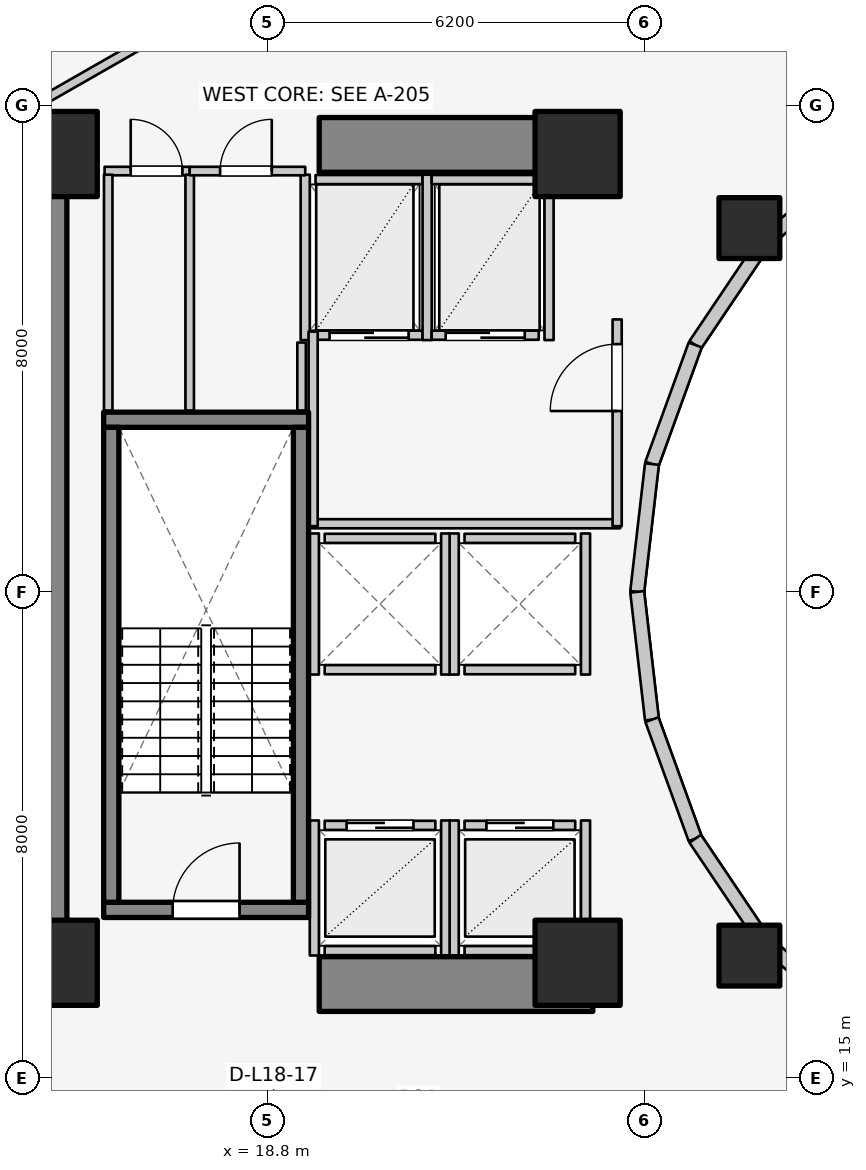
"""IFC4 building model, lengths in metres.
Left out: names, types, materials, properties, quantities, classifications, styles, units other than length and angle.
Written with IfcOpenShell. Run it as: python <this file> out.ifc"""

import sys

from ifc_helpers import new_model, si_unit, direction, frame, frame_2d, origin, origin_2d, place, context, subcontext, project, spatial, rectangle, extrude, element, fill, save


model = new_model("IFC4")
c1 = context("Model", 3, precision=1e-05, world=origin(), true_north=direction((0.0, 1.0)))
c2 = subcontext(c1, "Body", "Model", "MODEL_VIEW")
j1 = project(units=[si_unit("LENGTHUNIT", "METRE"), si_unit("PLANEANGLEUNIT", "RADIAN")], contexts=[c1])
p1 = place(None, origin())
s1 = spatial("IfcSite", under=j1, at=p1, CompositionType="ELEMENT")
p2 = place(p1, origin())
s2 = spatial("IfcBuilding", under=s1, at=p2, CompositionType="ELEMENT")
p3 = place(p2, frame((0.0, 0.0, 61.7)))
s3 = spatial("IfcBuildingStorey", under=s2, at=p3, CompositionType="ELEMENT", Elevation=61.7)
p4 = place(p3, frame((15.05, 17.05, 0.0), z_axis=(0.0, 0.0, 1.0), x_axis=(0.0, 1.0, 0.0)))
e1 = element("IfcWall", 1, at=p4, inside=s3, PredefinedType="SHEAR", context=c2, shape_type="SweptSolid", body=[
    extrude(rectangle(XDim=12.8, YDim=0.9, at=frame_2d((6.4, 0.0))), origin(), (0.0, 0.0, 1.0), 3.1),
])
for number, where, z_axis, x_axis in (
    (2, (19.65, 16.55, 0.0), (0.0, 0.0, 1.0), (1.0, 0.0, 0.0)),
    (3, (19.65, 30.35, 0.0), (0.0, 0.0, 1.0), (1.0, 0.0, 0.0)),
):
    element("IfcWall", number, at=place(p3, frame(where, z_axis=z_axis, x_axis=x_axis)), inside=s3, PredefinedType="SHEAR", context=c2, shape_type="SweptSolid", body=[
        extrude(rectangle(XDim=4.5, YDim=0.9, at=frame_2d((2.25, 0.0))), origin(), (0.0, 0.0, 1.0), 3.1),
    ])
p5 = place(p3, frame((16.105, 17.77, 0.0), z_axis=(0.0, 0.0, 1.0), x_axis=(1.0, 0.0, 0.0)))
e4 = element("IfcWall", 4, at=p5, inside=s3, PredefinedType="SOLIDWALL", context=c2, shape_type="SweptSolid", body=[
    extrude(rectangle(XDim=3.37, YDim=0.25, at=frame_2d((1.685, 0.0))), origin(), (0.0, 0.0, 1.0), 3.1),
])
p6 = place(p5, frame((1.135, 0.0, 0.0)))
e5 = element("IfcOpeningElement", 5, at=p6, cuts=e4, PredefinedType="OPENING", context=c2, shape_type="SweptSolid", body=[
    extrude(rectangle(XDim=1.1, YDim=2.1, at=frame_2d((0.55, 1.05))), frame((0.0, 0.135, 0.0), z_axis=(0.0, -1.0, 0.0), x_axis=(1.0, 0.0, 0.0)), (0.0, 0.0, 1.0), 0.27),
])
p7 = place(p3, frame((16.105, 25.83, 0.0), z_axis=(0.0, 0.0, 1.0), x_axis=(1.0, 0.0, 0.0)))
e6 = element("IfcWall", 6, at=p7, inside=s3, PredefinedType="SOLIDWALL", context=c2, shape_type="SweptSolid", body=[
    extrude(rectangle(XDim=3.37, YDim=0.25, at=frame_2d((1.685, 0.0))), origin(), (0.0, 0.0, 1.0), 3.1),
])
for number, where, z_axis, x_axis in (
    (7, (16.23, 17.895, 0.0), (0.0, 0.0, 1.0), (0.0, 1.0, 0.0)),
    (8, (19.35, 17.895, 0.0), (0.0, 0.0, 1.0), (0.0, 1.0, 0.0)),
):
    element("IfcWall", number, at=place(p3, frame(where, z_axis=z_axis, x_axis=x_axis)), inside=s3, PredefinedType="SOLIDWALL", context=c2, shape_type="SweptSolid", body=[
        extrude(rectangle(XDim=7.81, YDim=0.25, at=frame_2d((3.905, 0.0))), origin(), (0.0, 0.0, 1.0), 3.1),
    ])
for number, where, z_axis, x_axis in (
    (9, (15.3, 16.9, 0.0), (0.0, 0.0, 1.0), (1.0, 0.0, 0.0)),
    (10, (23.9, 16.9, 0.0), (0.0, 0.0, 1.0), (1.0, 0.0, 0.0)),
    (11, (23.9, 30.2, 0.0), (0.0, 0.0, 1.0), (1.0, 0.0, 0.0)),
    (12, (15.3, 30.2, 0.0), (0.0, 0.0, 1.0), (1.0, 0.0, 0.0)),
):
    element("IfcColumn", number, at=place(p3, frame(where, z_axis=z_axis, x_axis=x_axis)), inside=s3, PredefinedType="COLUMN", context=c2, shape_type="SweptSolid", body=[
        extrude(rectangle(XDim=1.4, YDim=1.4, at=origin_2d()), origin(), (0.0, 0.0, 1.0), 3.1),
    ])
for number, where, z_axis, x_axis in (
    (13, (26.725, 28.982, 0.0), (0.0, 0.0, 1.0), (1.0, 0.0, 0.0)),
    (14, (26.725, 17.018, 0.0), (0.0, 0.0, 1.0), (1.0, 0.0, 0.0)),
):
    element("IfcColumn", number, at=place(p3, frame(where, z_axis=z_axis, x_axis=x_axis)), inside=s3, PredefinedType="COLUMN", context=c2, shape_type="SweptSolid", body=[
        extrude(rectangle(XDim=1.0, YDim=1.0, at=origin_2d()), origin(), (0.0, 0.0, 1.0), 3.1),
    ])
p8 = place(p3, frame((28.44, 30.032, 0.0), z_axis=(0.0, 0.0, 1.0), x_axis=(-0.752576694707, -0.658504607869, 0.0)))
e15 = element("IfcWall", 15, at=p8, inside=s3, PredefinedType="STANDARD", context=c2, shape_type="SweptSolid", body=[
    extrude(rectangle(XDim=1.959, YDim=0.23, at=frame_2d((0.98, 0.0))), origin(), (0.0, 0.0, 1.0), 1.22),
])
p9 = place(p3, frame((26.965, 28.742, 0.0), z_axis=(0.0, 0.0, 1.0), x_axis=(-0.558197800898, -0.829707909492, 0.0)))
e16 = element("IfcWall", 16, at=p9, inside=s3, PredefinedType="STANDARD", context=c2, shape_type="SweptSolid", body=[
    extrude(rectangle(XDim=2.027, YDim=0.23, at=frame_2d((1.013, 0.0))), origin(), (0.0, 0.0, 1.0), 1.22),
])
p10 = place(p3, frame((25.834, 27.06, 0.0), z_axis=(0.0, 0.0, 1.0), x_axis=(-0.341423187295, -0.93990968033, 0.0)))
e17 = element("IfcWall", 17, at=p10, inside=s3, PredefinedType="STANDARD", context=c2, shape_type="SweptSolid", body=[
    extrude(rectangle(XDim=2.084, YDim=0.23, at=frame_2d((1.042, 0.0))), origin(), (0.0, 0.0, 1.0), 2.56),
])
for number, where, z_axis, x_axis in (
    (18, (25.123, 25.102, 0.0), (0.0, 0.0, 1.0), (-0.115, -0.993, 0.0)),
    (19, (24.88, 23.0, 0.0), (0.0, 0.0, 1.0), (0.115, -0.993, 0.0)),
):
    element("IfcWall", number, at=place(p3, frame(where, z_axis=z_axis, x_axis=x_axis)), inside=s3, PredefinedType="STANDARD", context=c2, shape_type="SweptSolid", body=[
        extrude(rectangle(XDim=2.115, YDim=0.23, at=frame_2d((1.058, 0.0))), origin(), (0.0, 0.0, 1.0), 2.56),
    ])
p11 = place(p3, frame((25.123, 20.898, 0.0), z_axis=(0.0, 0.0, 1.0), x_axis=(0.341423187295, -0.93990968033, 0.0)))
e20 = element("IfcWall", 20, at=p11, inside=s3, PredefinedType="STANDARD", context=c2, shape_type="SweptSolid", body=[
    extrude(rectangle(XDim=2.084, YDim=0.23, at=frame_2d((1.042, 0.0))), origin(), (0.0, 0.0, 1.0), 2.56),
])
p12 = place(p3, frame((25.834, 18.94, 0.0), z_axis=(0.0, 0.0, 1.0), x_axis=(0.558197800898, -0.829707909492, 0.0)))
e21 = element("IfcWall", 21, at=p12, inside=s3, PredefinedType="STANDARD", context=c2, shape_type="SweptSolid", body=[
    extrude(rectangle(XDim=2.027, YDim=0.23, at=frame_2d((1.013, 0.0))), origin(), (0.0, 0.0, 1.0), 1.22),
])
p13 = place(p3, frame((26.965, 17.258, 0.0), z_axis=(0.0, 0.0, 1.0), x_axis=(0.752576694707, -0.658504607869, 0.0)))
e22 = element("IfcWall", 22, at=p13, inside=s3, PredefinedType="STANDARD", context=c2, shape_type="SweptSolid", body=[
    extrude(rectangle(XDim=1.959, YDim=0.23, at=frame_2d((0.98, 0.0))), origin(), (0.0, 0.0, 1.0), 1.22),
])
p14 = place(p3, frame((19.74, 19.16, 0.0), z_axis=(0.0, 0.0, 1.0), x_axis=(1.0, 0.0, 0.0)))
e23 = element("IfcWall", 23, at=p14, inside=s3, PredefinedType="SOLIDWALL", context=c2, shape_type="SweptSolid", body=[
    extrude(rectangle(XDim=1.82, YDim=0.15, at=frame_2d((0.91, 0.0))), origin(), (0.0, 0.0, 1.0), 2.575),
])
p15 = place(p14, frame((0.36, 0.0, 0.0)))
e24 = element("IfcOpeningElement", 24, at=p15, cuts=e23, PredefinedType="OPENING", context=c2, shape_type="SweptSolid", body=[
    extrude(rectangle(XDim=1.1, YDim=2.1, at=frame_2d((0.55, 1.05))), frame((0.0, 0.085, 0.0), z_axis=(0.0, -1.0, 0.0), x_axis=(1.0, 0.0, 0.0)), (0.0, 0.0, 1.0), 0.17),
])
p16 = place(p3, frame((19.74, 17.1, 0.0), z_axis=(0.0, 0.0, 1.0), x_axis=(1.0, 0.0, 0.0)))
e25 = element("IfcWall", 25, at=p16, inside=s3, PredefinedType="SOLIDWALL", context=c2, shape_type="SweptSolid", body=[
    extrude(rectangle(XDim=1.82, YDim=0.15, at=frame_2d((0.91, 0.0))), origin(), (0.0, 0.0, 1.0), 2.575),
])
p17 = place(p3, frame((19.57, 17.02, 0.0), z_axis=(0.0, 0.0, 1.0), x_axis=(0.0, 1.0, 0.0)))
e26 = element("IfcWall", 26, at=p17, inside=s3, PredefinedType="SOLIDWALL", context=c2, shape_type="SweptSolid", body=[
    extrude(rectangle(XDim=2.22, YDim=0.15, at=frame_2d((1.11, 0.0))), origin(), (0.0, 0.0, 1.0), 2.12),
])
p18 = place(p3, frame((21.73, 17.02, 0.0), z_axis=(0.0, 0.0, 1.0), x_axis=(0.0, 1.0, 0.0)))
e27 = element("IfcWall", 27, at=p18, inside=s3, PredefinedType="SOLIDWALL", context=c2, shape_type="SweptSolid", body=[
    extrude(rectangle(XDim=2.22, YDim=0.15, at=frame_2d((1.11, 0.0))), origin(), (0.0, 0.0, 1.0), 2.575),
])
p19 = place(p3, frame((22.04, 19.16, 0.0), z_axis=(0.0, 0.0, 1.0), x_axis=(1.0, 0.0, 0.0)))
e28 = element("IfcWall", 28, at=p19, inside=s3, PredefinedType="SOLIDWALL", context=c2, shape_type="SweptSolid", body=[
    extrude(rectangle(XDim=1.82, YDim=0.15, at=frame_2d((0.91, 0.0))), origin(), (0.0, 0.0, 1.0), 2.12),
])
p20 = place(p19, frame((0.36, 0.0, 0.0)))
e29 = element("IfcOpeningElement", 29, at=p20, cuts=e28, PredefinedType="OPENING", context=c2, shape_type="SweptSolid", body=[
    extrude(rectangle(XDim=1.1, YDim=2.1, at=frame_2d((0.55, 1.05))), frame((0.0, 0.085, 0.0), z_axis=(0.0, -1.0, 0.0), x_axis=(1.0, 0.0, 0.0)), (0.0, 0.0, 1.0), 0.17),
])
p21 = place(p3, frame((22.04, 17.1, 0.0), z_axis=(0.0, 0.0, 1.0), x_axis=(1.0, 0.0, 0.0)))
e30 = element("IfcWall", 30, at=p21, inside=s3, PredefinedType="SOLIDWALL", context=c2, shape_type="SweptSolid", body=[
    extrude(rectangle(XDim=1.82, YDim=0.15, at=frame_2d((0.91, 0.0))), origin(), (0.0, 0.0, 1.0), 2.12),
])
p22 = place(p3, frame((21.87, 17.02, 0.0), z_axis=(0.0, 0.0, 1.0), x_axis=(0.0, 1.0, 0.0)))
e31 = element("IfcWall", 31, at=p22, inside=s3, PredefinedType="SOLIDWALL", context=c2, shape_type="SweptSolid", body=[
    extrude(rectangle(XDim=2.22, YDim=0.15, at=frame_2d((1.11, 0.0))), origin(), (0.0, 0.0, 1.0), 2.575),
])
p23 = place(p3, frame((24.03, 17.02, 0.0), z_axis=(0.0, 0.0, 1.0), x_axis=(0.0, 1.0, 0.0)))
e32 = element("IfcWall", 32, at=p23, inside=s3, PredefinedType="SOLIDWALL", context=c2, shape_type="SweptSolid", body=[
    extrude(rectangle(XDim=2.22, YDim=0.15, at=frame_2d((1.11, 0.0))), origin(), (0.0, 0.0, 1.0), 1.873),
])
for number, where, z_axis, x_axis in (
    (33, (19.74, 21.72, 0.0), (0.0, 0.0, 1.0), (1.0, 0.0, 0.0)),
    (34, (19.74, 23.88, 0.0), (0.0, 0.0, 1.0), (1.0, 0.0, 0.0)),
):
    element("IfcWall", number, at=place(p3, frame(where, z_axis=z_axis, x_axis=x_axis)), inside=s3, PredefinedType="SOLIDWALL", context=c2, shape_type="SweptSolid", body=[
        extrude(rectangle(XDim=1.82, YDim=0.15, at=frame_2d((0.91, 0.0))), origin(), (0.0, 0.0, 1.0), 2.575),
    ])
for number, where, z_axis, x_axis in (
    (35, (19.57, 21.64, 0.0), (0.0, 0.0, 1.0), (0.0, 1.0, 0.0)),
    (36, (21.73, 21.64, 0.0), (0.0, 0.0, 1.0), (0.0, 1.0, 0.0)),
):
    element("IfcWall", number, at=place(p3, frame(where, z_axis=z_axis, x_axis=x_axis)), inside=s3, PredefinedType="SOLIDWALL", context=c2, shape_type="SweptSolid", body=[
        extrude(rectangle(XDim=2.32, YDim=0.15, at=frame_2d((1.16, 0.0))), origin(), (0.0, 0.0, 1.0), 2.575),
    ])
for number, where, z_axis, x_axis in (
    (37, (22.04, 21.72, 0.0), (0.0, 0.0, 1.0), (1.0, 0.0, 0.0)),
    (38, (22.04, 23.88, 0.0), (0.0, 0.0, 1.0), (1.0, 0.0, 0.0)),
):
    element("IfcWall", number, at=place(p3, frame(where, z_axis=z_axis, x_axis=x_axis)), inside=s3, PredefinedType="SOLIDWALL", context=c2, shape_type="SweptSolid", body=[
        extrude(rectangle(XDim=1.82, YDim=0.15, at=frame_2d((0.91, 0.0))), origin(), (0.0, 0.0, 1.0), 2.12),
    ])
p24 = place(p3, frame((21.87, 21.64, 0.0), z_axis=(0.0, 0.0, 1.0), x_axis=(0.0, 1.0, 0.0)))
e39 = element("IfcWall", 39, at=p24, inside=s3, PredefinedType="SOLIDWALL", context=c2, shape_type="SweptSolid", body=[
    extrude(rectangle(XDim=2.32, YDim=0.15, at=frame_2d((1.16, 0.0))), origin(), (0.0, 0.0, 1.0), 2.575),
])
p25 = place(p3, frame((24.03, 21.64, 0.0), z_axis=(0.0, 0.0, 1.0), x_axis=(0.0, 1.0, 0.0)))
e40 = element("IfcWall", 40, at=p25, inside=s3, PredefinedType="SOLIDWALL", context=c2, shape_type="SweptSolid", body=[
    extrude(rectangle(XDim=2.32, YDim=0.15, at=frame_2d((1.16, 0.0))), origin(), (0.0, 0.0, 1.0), 2.12),
])
p26 = place(p3, frame((19.59, 27.22, 0.0), z_axis=(0.0, 0.0, 1.0), x_axis=(1.0, 0.0, 0.0)))
e41 = element("IfcWall", 41, at=p26, inside=s3, PredefinedType="SOLIDWALL", context=c2, shape_type="SweptSolid", body=[
    extrude(rectangle(XDim=1.76, YDim=0.15, at=frame_2d((0.88, 0.0))), origin(), (0.0, 0.0, 1.0), 2.575),
])
p27 = place(p26, frame((0.23, 0.0, 0.0)))
e42 = element("IfcOpeningElement", 42, at=p27, cuts=e41, PredefinedType="OPENING", context=c2, shape_type="SweptSolid", body=[
    extrude(rectangle(XDim=1.3, YDim=2.1, at=frame_2d((0.65, 1.05))), frame((0.0, 0.085, 0.0), z_axis=(0.0, -1.0, 0.0), x_axis=(1.0, 0.0, 0.0)), (0.0, 0.0, 1.0), 0.17),
])
p28 = place(p3, frame((19.59, 29.78, 0.0), z_axis=(0.0, 0.0, 1.0), x_axis=(1.0, 0.0, 0.0)))
e43 = element("IfcWall", 43, at=p28, inside=s3, PredefinedType="SOLIDWALL", context=c2, shape_type="SweptSolid", body=[
    extrude(rectangle(XDim=1.76, YDim=0.15, at=frame_2d((0.88, 0.0))), origin(), (0.0, 0.0, 1.0), 2.575),
])
for number, where, z_axis, x_axis in (
    (44, (19.42, 27.14, 0.0), (0.0, 0.0, 1.0), (0.0, 1.0, 0.0)),
    (45, (21.425, 27.14, 0.0), (0.0, 0.0, 1.0), (0.0, 1.0, 0.0)),
):
    element("IfcWall", number, at=place(p3, frame(where, z_axis=z_axis, x_axis=x_axis)), inside=s3, PredefinedType="SOLIDWALL", context=c2, shape_type="SweptSolid", body=[
        extrude(rectangle(XDim=2.72, YDim=0.15, at=frame_2d((1.36, 0.0))), origin(), (0.0, 0.0, 1.0), 2.575),
    ])
p29 = place(p3, frame((21.5, 27.22, 0.0), z_axis=(0.0, 0.0, 1.0), x_axis=(1.0, 0.0, 0.0)))
e46 = element("IfcWall", 46, at=p29, inside=s3, PredefinedType="SOLIDWALL", context=c2, shape_type="SweptSolid", body=[
    extrude(rectangle(XDim=1.76, YDim=0.15, at=frame_2d((0.88, 0.0))), origin(), (0.0, 0.0, 1.0), 2.575),
])
p30 = place(p29, frame((0.23, 0.0, 0.0)))
e47 = element("IfcOpeningElement", 47, at=p30, cuts=e46, PredefinedType="OPENING", context=c2, shape_type="SweptSolid", body=[
    extrude(rectangle(XDim=1.3, YDim=2.1, at=frame_2d((0.65, 1.05))), frame((0.0, 0.085, 0.0), z_axis=(0.0, -1.0, 0.0), x_axis=(1.0, 0.0, 0.0)), (0.0, 0.0, 1.0), 0.17),
])
p31 = place(p3, frame((21.5, 29.78, 0.0), z_axis=(0.0, 0.0, 1.0), x_axis=(1.0, 0.0, 0.0)))
e48 = element("IfcWall", 48, at=p31, inside=s3, PredefinedType="SOLIDWALL", context=c2, shape_type="SweptSolid", body=[
    extrude(rectangle(XDim=1.76, YDim=0.15, at=frame_2d((0.88, 0.0))), origin(), (0.0, 0.0, 1.0), 2.575),
])
p32 = place(p3, frame((23.43, 27.14, 0.0), z_axis=(0.0, 0.0, 1.0), x_axis=(0.0, 1.0, 0.0)))
e49 = element("IfcWall", 49, at=p32, inside=s3, PredefinedType="SOLIDWALL", context=c2, shape_type="SweptSolid", body=[
    extrude(rectangle(XDim=2.72, YDim=0.15, at=frame_2d((1.36, 0.0))), origin(), (0.0, 0.0, 1.0), 2.575),
])
p33 = place(p3, frame((19.52, 24.12, 0.0), z_axis=(0.0, 0.0, 1.0), x_axis=(1.0, 0.0, 0.0)))
e50 = element("IfcWall", 50, at=p33, inside=s3, PredefinedType="PARTITIONING", context=c2, shape_type="SweptSolid", body=[
    extrude(rectangle(XDim=5.08, YDim=0.15, at=frame_2d((2.54, 0.0))), origin(), (0.0, 0.0, 1.0), 2.12),
])
p34 = place(p3, frame((19.55, 24.08, 0.0), z_axis=(0.0, 0.0, 1.0), x_axis=(0.0, 1.0, 0.0)))
e51 = element("IfcWall", 51, at=p34, inside=s3, PredefinedType="PARTITIONING", context=c2, shape_type="SweptSolid", body=[
    extrude(rectangle(XDim=3.2, YDim=0.15, at=frame_2d((1.6, 0.0))), origin(), (0.0, 0.0, 1.0), 2.575),
])
p35 = place(p3, frame((24.55, 24.08, 0.0), z_axis=(0.0, 0.0, 1.0), x_axis=(0.0, 1.0, 0.0)))
e52 = element("IfcWall", 52, at=p35, inside=s3, PredefinedType="PARTITIONING", context=c2, shape_type="SweptSolid", body=[
    extrude(rectangle(XDim=3.4, YDim=0.15, at=frame_2d((1.7, 0.0))), origin(), (0.0, 0.0, 1.0), 2.575),
])
p36 = place(p35, frame((1.894, 0.0, 0.0)))
e53 = element("IfcOpeningElement", 53, at=p36, cuts=e52, PredefinedType="OPENING", context=c2, shape_type="SweptSolid", body=[
    extrude(rectangle(XDim=1.1, YDim=2.1, at=frame_2d((0.55, 1.05))), frame((0.0, 0.085, 0.0), z_axis=(0.0, -1.0, 0.0), x_axis=(1.0, 0.0, 0.0)), (0.0, 0.0, 1.0), 0.17),
])
p37 = place(p3, frame((16.12, 29.92, 0.0), z_axis=(0.0, 0.0, 1.0), x_axis=(1.0, 0.0, 0.0)))
e54 = element("IfcWall", 54, at=p37, inside=s3, PredefinedType="PLUMBINGWALL", context=c2, shape_type="SweptSolid", body=[
    extrude(rectangle(XDim=1.4, YDim=0.14, at=frame_2d((0.7, 0.0))), origin(), (0.0, 0.0, 1.0), 2.575),
])
p38 = place(p37, frame((0.43, 0.0, 0.0)))
e55 = element("IfcOpeningElement", 55, at=p38, cuts=e54, PredefinedType="OPENING", context=c2, shape_type="SweptSolid", body=[
    extrude(rectangle(XDim=0.85, YDim=2.05, at=frame_2d((0.425, 1.025))), frame((0.0, 0.08, 0.0), z_axis=(0.0, -1.0, 0.0), x_axis=(1.0, 0.0, 0.0)), (0.0, 0.0, 1.0), 0.16),
])
for number, where, z_axis, x_axis in (
    (56, (16.18, 25.98, 0.0), (0.0, 0.0, 1.0), (0.0, 1.0, 0.0)),
    (57, (17.52, 25.98, 0.0), (0.0, 0.0, 1.0), (0.0, 1.0, 0.0)),
):
    element("IfcWall", number, at=place(p3, frame(where, z_axis=z_axis, x_axis=x_axis)), inside=s3, PredefinedType="PLUMBINGWALL", context=c2, shape_type="SweptSolid", body=[
        extrude(rectangle(XDim=3.88, YDim=0.14, at=frame_2d((1.94, 0.0))), origin(), (0.0, 0.0, 1.0), 2.575),
    ])
p39 = place(p3, frame((17.52, 29.92, 0.0), z_axis=(0.0, 0.0, 1.0), x_axis=(1.0, 0.0, 0.0)))
e58 = element("IfcWall", 58, at=p39, inside=s3, PredefinedType="PLUMBINGWALL", context=c2, shape_type="SweptSolid", body=[
    extrude(rectangle(XDim=1.9, YDim=0.14, at=frame_2d((0.95, 0.0))), origin(), (0.0, 0.0, 1.0), 2.575),
])
p40 = place(p39, frame((0.5, 0.0, 0.0)))
e59 = element("IfcOpeningElement", 59, at=p40, cuts=e58, PredefinedType="OPENING", context=c2, shape_type="SweptSolid", body=[
    extrude(rectangle(XDim=0.85, YDim=2.05, at=frame_2d((0.425, 1.025))), frame((0.0, 0.08, 0.0), z_axis=(0.0, -1.0, 0.0), x_axis=(1.0, 0.0, 0.0)), (0.0, 0.0, 1.0), 0.16),
])
p41 = place(p3, frame((19.36, 25.98, 0.0), z_axis=(0.0, 0.0, 1.0), x_axis=(0.0, 1.0, 0.0)))
e60 = element("IfcWall", 60, at=p41, inside=s3, PredefinedType="PLUMBINGWALL", context=c2, shape_type="SweptSolid", body=[
    extrude(rectangle(XDim=1.12, YDim=0.14, at=frame_2d((0.56, 0.0))), origin(), (0.0, 0.0, 1.0), 2.575),
])
p42 = place(p3, frame((17.243, 32.305, 0.0), z_axis=(0.0, 0.0, 1.0), x_axis=(-0.867991349648, -0.496579315857, 0.0)))
e61 = element("IfcWall", 61, at=p42, inside=s3, PredefinedType="PARTITIONING", context=c2, shape_type="SweptSolid", body=[
    extrude(rectangle(XDim=2.567, YDim=0.15, at=frame_2d((1.283, 0.0))), origin(), (0.0, 0.0, 1.0), 1.22),
])
p43 = place(p6, origin())
e62 = element("IfcDoor", 62, at=p43, inside=s3, OperationType="SINGLE_SWING_RIGHT", PredefinedType="DOOR", context=c2, shape_type="SweptSolid", body=[
    extrude(rectangle(XDim=1.1, YDim=2.1, at=frame_2d((0.55, 1.05))), frame((0.0, 0.025, 0.0), z_axis=(0.0, -1.0, 0.0), x_axis=(1.0, 0.0, 0.0)), (0.0, 0.0, 1.0), 0.05),
])
fill(e5, e62)
p44 = place(p15, origin())
e63 = element("IfcDoor", 63, at=p44, inside=s3, OperationType="DOUBLE_DOOR_SLIDING", PredefinedType="DOOR", context=c2, shape_type="SweptSolid", body=[
    extrude(rectangle(XDim=1.1, YDim=2.1, at=frame_2d((0.55, 1.05))), frame((0.0, 0.025, 0.0), z_axis=(0.0, -1.0, 0.0), x_axis=(1.0, 0.0, 0.0)), (0.0, 0.0, 1.0), 0.05),
])
fill(e24, e63)
p45 = place(p20, origin())
e64 = element("IfcDoor", 64, at=p45, inside=s3, OperationType="DOUBLE_DOOR_SLIDING", PredefinedType="DOOR", context=c2, shape_type="SweptSolid", body=[
    extrude(rectangle(XDim=1.1, YDim=2.1, at=frame_2d((0.55, 1.05))), frame((0.0, 0.025, 0.0), z_axis=(0.0, -1.0, 0.0), x_axis=(1.0, 0.0, 0.0)), (0.0, 0.0, 1.0), 0.05),
])
fill(e29, e64)
p46 = place(p27, origin())
e65 = element("IfcDoor", 65, at=p46, inside=s3, OperationType="DOUBLE_DOOR_SLIDING", PredefinedType="DOOR", context=c2, shape_type="SweptSolid", body=[
    extrude(rectangle(XDim=1.3, YDim=2.1, at=frame_2d((0.65, 1.05))), frame((0.0, 0.025, 0.0), z_axis=(0.0, -1.0, 0.0), x_axis=(1.0, 0.0, 0.0)), (0.0, 0.0, 1.0), 0.05),
])
fill(e42, e65)
p47 = place(p30, origin())
e66 = element("IfcDoor", 66, at=p47, inside=s3, OperationType="DOUBLE_DOOR_SLIDING", PredefinedType="DOOR", context=c2, shape_type="SweptSolid", body=[
    extrude(rectangle(XDim=1.3, YDim=2.1, at=frame_2d((0.65, 1.05))), frame((0.0, 0.025, 0.0), z_axis=(0.0, -1.0, 0.0), x_axis=(1.0, 0.0, 0.0)), (0.0, 0.0, 1.0), 0.05),
])
fill(e47, e66)
p48 = place(p36, origin())
e67 = element("IfcDoor", 67, at=p48, inside=s3, OperationType="SINGLE_SWING_LEFT", PredefinedType="DOOR", context=c2, shape_type="SweptSolid", body=[
    extrude(rectangle(XDim=1.1, YDim=2.1, at=frame_2d((0.55, 1.05))), frame((0.0, 0.025, 0.0), z_axis=(0.0, -1.0, 0.0), x_axis=(1.0, 0.0, 0.0)), (0.0, 0.0, 1.0), 0.05),
])
fill(e53, e67)
p49 = place(p38, origin())
e68 = element("IfcDoor", 68, at=p49, inside=s3, OperationType="SINGLE_SWING_LEFT", PredefinedType="DOOR", context=c2, shape_type="SweptSolid", body=[
    extrude(rectangle(XDim=0.85, YDim=2.05, at=frame_2d((0.425, 1.025))), frame((0.0, 0.025, 0.0), z_axis=(0.0, -1.0, 0.0), x_axis=(1.0, 0.0, 0.0)), (0.0, 0.0, 1.0), 0.05),
])
fill(e55, e68)
p50 = place(p40, origin())
e69 = element("IfcDoor", 69, at=p50, inside=s3, OperationType="SINGLE_SWING_RIGHT", PredefinedType="DOOR", context=c2, shape_type="SweptSolid", body=[
    extrude(rectangle(XDim=0.85, YDim=2.05, at=frame_2d((0.425, 1.025))), frame((0.0, 0.025, 0.0), z_axis=(0.0, -1.0, 0.0), x_axis=(1.0, 0.0, 0.0)), (0.0, 0.0, 1.0), 0.05),
])
fill(e59, e69)
save(model, sys.argv[1])
